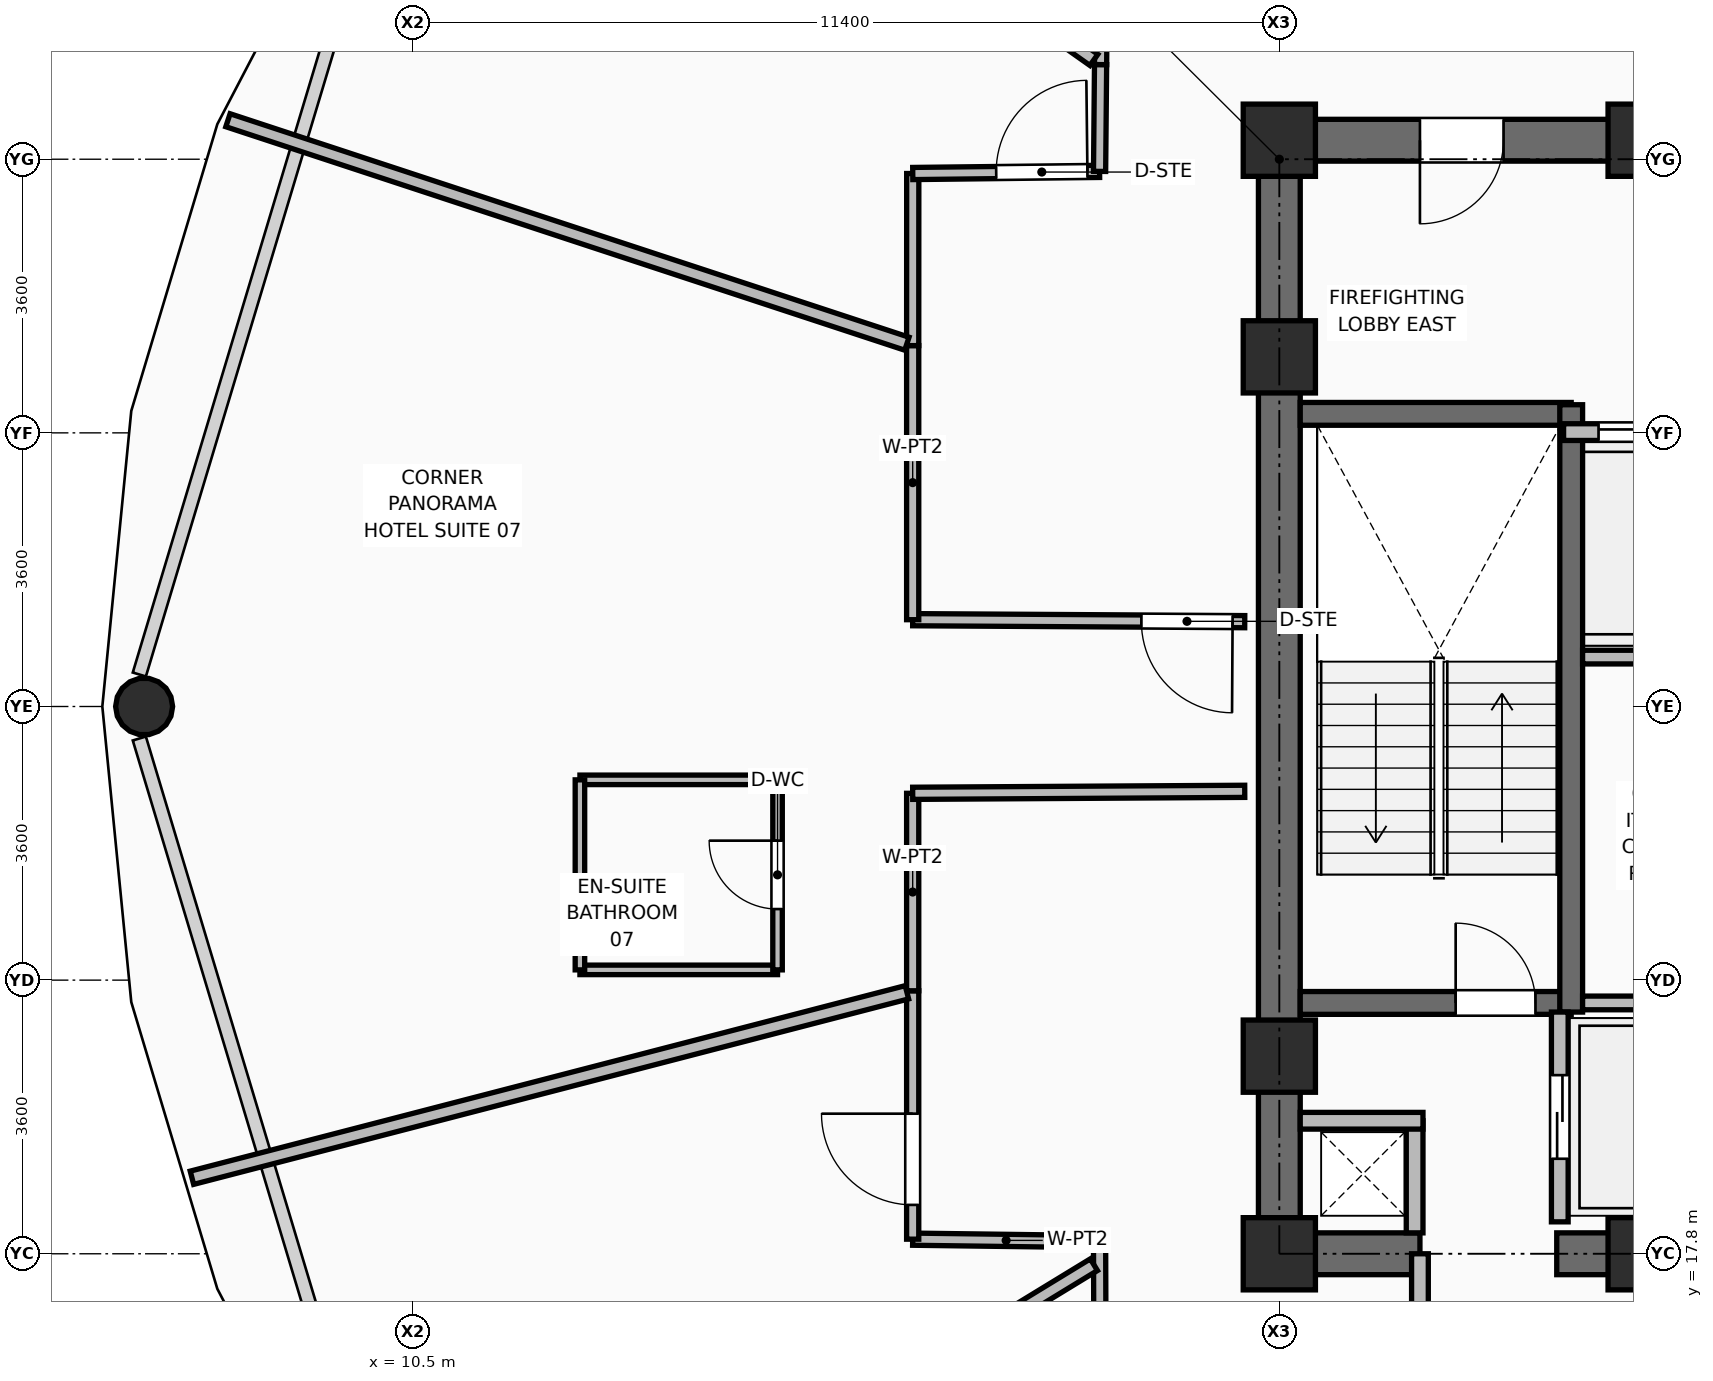
"""IFC4 building model, lengths in metres.
Left out: names, types, materials, properties, quantities, classifications, styles, units other than length and angle.
Written with IfcOpenShell. Run it as: python <this file> out.ifc"""

import sys

from ifc_helpers import new_model, si_unit, direction, frame, frame_2d, origin, origin_2d, place, context, subcontext, project, spatial, rectangle, hollow_circle, extrude, element, fill, save


model = new_model("IFC4")
c1 = context("Model", 3, precision=1e-05, world=origin(), true_north=direction((0.0, 1.0)))
c2 = subcontext(c1, "Body", "Model", "MODEL_VIEW")
j1 = project(units=[si_unit("LENGTHUNIT", "METRE"), si_unit("PLANEANGLEUNIT", "RADIAN")], contexts=[c1])
p1 = place(None, origin())
s1 = spatial("IfcSite", under=j1, at=p1, CompositionType="ELEMENT")
p2 = place(p1, origin())
s2 = spatial("IfcBuilding", under=s1, at=p2, CompositionType="ELEMENT")
p3 = place(p2, frame((0.0, 0.0, 168.45)))
s3 = spatial("IfcBuildingStorey", under=s2, at=p3, CompositionType="ELEMENT", Elevation=168.45)
for number, where, z_axis, x_axis in (
    (1, (21.9, 17.8, 0.0), (0.0, 0.0, 1.0), (1.0, 0.0, 0.0)),
    (2, (26.7, 17.8, 0.0), (0.0, 0.0, 1.0), (1.0, 0.0, 0.0)),
    (3, (21.9, 20.4, 0.0), (0.0, 0.0, 1.0), (1.0, 0.0, 0.0)),
    (4, (21.9, 29.6, 0.0), (0.0, 0.0, 1.0), (1.0, 0.0, 0.0)),
    (5, (21.9, 32.45, 0.0), (0.0, 0.0, 1.0), (1.0, 0.0, 0.0)),
    (6, (26.7, 32.45, 0.0), (0.0, 0.0, 1.0), (1.0, 0.0, 0.0)),
):
    element("IfcColumn", number, at=place(p3, frame(where, z_axis=z_axis, x_axis=x_axis)), inside=s3, PredefinedType="COLUMN", context=c2, shape_type="SweptSolid", body=[
        extrude(rectangle(XDim=0.95, YDim=0.95, at=origin_2d()), origin(), (0.0, 0.0, 1.0), 3.75),
    ])
p4 = place(p3, frame((6.964, 25.0, 0.0), z_axis=(0.0, 0.0, 1.0), x_axis=(1.0, 0.0, 0.0)))
e7 = element("IfcColumn", 7, at=p4, inside=s3, PredefinedType="COLUMN", context=c2, shape_type="SweptSolid", body=[
    extrude(hollow_circle(Radius=0.375, WallThickness=0.035, at=origin_2d()), origin(), (0.0, 0.0, 1.0), 3.57),
])
p5 = place(p3, frame((21.625, 17.8, 0.0), z_axis=(0.0, 0.0, 1.0), x_axis=(1.0, 0.0, 0.0)))
e8 = element("IfcWall", 8, at=p5, inside=s3, PredefinedType="SHEAR", context=c2, shape_type="SweptSolid", body=[
    extrude(rectangle(XDim=2.125, YDim=0.55, at=frame_2d((1.062, 0.0))), origin(), (0.0, 0.0, 1.0), 3.57),
])
p6 = place(p3, frame((25.55, 17.8, 0.0), z_axis=(0.0, 0.0, 1.0), x_axis=(1.0, 0.0, 0.0)))
e9 = element("IfcWall", 9, at=p6, inside=s3, PredefinedType="SHEAR", context=c2, shape_type="SweptSolid", body=[
    extrude(rectangle(XDim=6.9, YDim=0.55, at=frame_2d((3.45, 0.0))), origin(), (0.0, 0.0, 1.0), 3.57),
])
p7 = place(p3, frame((21.625, 32.45, 0.0), z_axis=(0.0, 0.0, 1.0), x_axis=(1.0, 0.0, 0.0)))
e10 = element("IfcWall", 10, at=p7, inside=s3, PredefinedType="SHEAR", context=c2, shape_type="SweptSolid", body=[
    extrude(rectangle(XDim=19.75, YDim=0.55, at=frame_2d((9.875, 0.0))), origin(), (0.0, 0.0, 1.0), 3.57),
])
p8 = place(p7, frame((2.125, 0.0, 0.0)))
e11 = element("IfcOpeningElement", 11, at=p8, cuts=e10, PredefinedType="OPENING", context=c2, shape_type="SweptSolid", body=[
    extrude(rectangle(XDim=1.1, YDim=2.1, at=frame_2d((0.55, 1.05))), frame((0.0, 0.285, 0.0), z_axis=(0.0, -1.0, 0.0), x_axis=(1.0, 0.0, 0.0)), (0.0, 0.0, 1.0), 0.57),
])
p9 = place(p7, frame((15.515, 0.0, 0.0)))
e12 = element("IfcOpeningElement", 12, at=p9, cuts=e10, PredefinedType="OPENING", context=c2, shape_type="SweptSolid", body=[
    extrude(rectangle(XDim=1.0, YDim=2.1, at=frame_2d((0.5, 1.05))), frame((0.0, 0.285, 0.0), z_axis=(0.0, -1.0, 0.0), x_axis=(1.0, 0.0, 0.0)), (0.0, 0.0, 1.0), 0.57),
])
p10 = place(p7, frame((17.525, 0.0, 0.0)))
e13 = element("IfcOpeningElement", 13, at=p10, cuts=e10, PredefinedType="OPENING", context=c2, shape_type="SweptSolid", body=[
    extrude(rectangle(XDim=0.9, YDim=2.1, at=frame_2d((0.45, 1.05))), frame((0.0, 0.285, 0.0), z_axis=(0.0, -1.0, 0.0), x_axis=(1.0, 0.0, 0.0)), (0.0, 0.0, 1.0), 0.57),
])
p11 = place(p3, frame((21.9, 18.075, 0.0), z_axis=(0.0, 0.0, 1.0), x_axis=(0.0, 1.0, 0.0)))
e14 = element("IfcWall", 14, at=p11, inside=s3, PredefinedType="SHEAR", context=c2, shape_type="SweptSolid", body=[
    extrude(rectangle(XDim=14.1, YDim=0.55, at=frame_2d((7.05, 0.0))), origin(), (0.0, 0.0, 1.0), 3.57),
])
p12 = place(p3, frame((22.175, 21.1, 0.0), z_axis=(0.0, 0.0, 1.0), x_axis=(1.0, 0.0, 0.0)))
e15 = element("IfcWall", 15, at=p12, inside=s3, PredefinedType="SHEAR", context=c2, shape_type="SweptSolid", body=[
    extrude(rectangle(XDim=3.565, YDim=0.3, at=frame_2d((1.782, 0.0))), origin(), (0.0, 0.0, 1.0), 3.57),
])
p13 = place(p12, frame((2.045, 0.0, 0.0)))
e16 = element("IfcOpeningElement", 16, at=p13, cuts=e15, PredefinedType="OPENING", context=c2, shape_type="SweptSolid", body=[
    extrude(rectangle(XDim=1.05, YDim=2.1, at=frame_2d((0.525, 1.05))), frame((0.0, 0.16, 0.0), z_axis=(0.0, -1.0, 0.0), x_axis=(1.0, 0.0, 0.0)), (0.0, 0.0, 1.0), 0.32),
])
p14 = place(p3, frame((22.175, 28.85, 0.0), z_axis=(0.0, 0.0, 1.0), x_axis=(1.0, 0.0, 0.0)))
e17 = element("IfcWall", 17, at=p14, inside=s3, PredefinedType="SHEAR", context=c2, shape_type="SweptSolid", body=[
    extrude(rectangle(XDim=3.565, YDim=0.3, at=frame_2d((1.782, 0.0))), origin(), (0.0, 0.0, 1.0), 3.57),
])
p15 = place(p3, frame((25.74, 20.98, 0.0), z_axis=(0.0, 0.0, 1.0), x_axis=(0.0, 1.0, 0.0)))
e18 = element("IfcWall", 18, at=p15, inside=s3, PredefinedType="SHEAR", context=c2, shape_type="SweptSolid", body=[
    extrude(rectangle(XDim=7.99, YDim=0.3, at=frame_2d((3.995, 0.0))), origin(), (0.0, 0.0, 1.0), 3.57),
])
p16 = place(p3, frame((23.68, 18.075, 0.0), z_axis=(0.0, 0.0, 1.0), x_axis=(0.0, 1.0, 0.0)))
e19 = element("IfcWall", 19, at=p16, inside=s3, PredefinedType="PARTITIONING", context=c2, shape_type="SweptSolid", body=[
    extrude(rectangle(XDim=1.475, YDim=0.22, at=frame_2d((0.738, 0.0))), origin(), (0.0, 0.0, 1.0), 3.55),
])
p17 = place(p3, frame((22.175, 19.55, 0.0), z_axis=(0.0, 0.0, 1.0), x_axis=(1.0, 0.0, 0.0)))
e20 = element("IfcWall", 20, at=p17, inside=s3, PredefinedType="PARTITIONING", context=c2, shape_type="SweptSolid", body=[
    extrude(rectangle(XDim=1.615, YDim=0.22, at=frame_2d((0.808, 0.0))), origin(), (0.0, 0.0, 1.0), 2.595),
])
p18 = place(p3, frame((25.59, 18.22, 0.0), z_axis=(0.0, 0.0, 1.0), x_axis=(0.0, 1.0, 0.0)))
e21 = element("IfcWall", 21, at=p18, inside=s3, PredefinedType="PARTITIONING", context=c2, shape_type="SweptSolid", body=[
    extrude(rectangle(XDim=2.76, YDim=0.22, at=frame_2d((1.38, 0.0))), origin(), (0.0, 0.0, 1.0), 3.55),
])
p19 = place(p18, frame((0.83, 0.0, 0.0)))
e22 = element("IfcOpeningElement", 22, at=p19, cuts=e21, PredefinedType="OPENING", context=c2, shape_type="SweptSolid", body=[
    extrude(rectangle(XDim=1.1, YDim=2.2, at=frame_2d((0.55, 1.1))), frame((0.0, 0.12, 0.0), z_axis=(0.0, -1.0, 0.0), x_axis=(1.0, 0.0, 0.0)), (0.0, 0.0, 1.0), 0.24),
])
p20 = place(p3, frame((25.64, 28.61, 0.0), z_axis=(0.0, 0.0, 1.0), x_axis=(1.0, 0.0, 0.0)))
e23 = element("IfcWall", 23, at=p20, inside=s3, PredefinedType="PARTITIONING", context=c2, shape_type="SweptSolid", body=[
    extrude(rectangle(XDim=2.02, YDim=0.22, at=frame_2d((1.01, 0.0))), origin(), (0.0, 0.0, 1.0), 3.55),
])
p21 = place(p20, frame((0.46, 0.0, 0.0)))
e24 = element("IfcOpeningElement", 24, at=p21, cuts=e23, PredefinedType="OPENING", context=c2, shape_type="SweptSolid", body=[
    extrude(rectangle(XDim=1.1, YDim=2.2, at=frame_2d((0.55, 1.1))), frame((0.0, 0.12, 0.0), z_axis=(0.0, -1.0, 0.0), x_axis=(1.0, 0.0, 0.0)), (0.0, 0.0, 1.0), 0.24),
])
for number, where, z_axis, x_axis in (
    (25, (25.89, 21.1, 0.0), (0.0, 0.0, 1.0), (1.0, 0.0, 0.0)),
    (26, (25.89, 25.65, 0.0), (0.0, 0.0, 1.0), (1.0, 0.0, 0.0)),
):
    element("IfcWall", number, at=place(p3, frame(where, z_axis=z_axis, x_axis=x_axis)), inside=s3, PredefinedType="PARTITIONING", context=c2, shape_type="SweptSolid", body=[
        extrude(rectangle(XDim=1.7, YDim=0.18, at=frame_2d((0.85, 0.0))), origin(), (0.0, 0.0, 1.0), 3.55),
    ])
p22 = place(p3, frame((23.75, 14.35, 0.0), z_axis=(0.0, 0.0, 1.0), x_axis=(0.0, 1.0, 0.0)))
e27 = element("IfcWall", 27, at=p22, inside=s3, PredefinedType="PARTITIONING", context=c2, shape_type="SweptSolid", body=[
    extrude(rectangle(XDim=3.45, YDim=0.22, at=frame_2d((1.725, 0.0))), origin(), (0.0, 0.0, 1.0), 3.006),
])
p23 = place(p3, frame((21.445, 26.116, 0.0), z_axis=(0.0, 0.0, 1.0), x_axis=(-0.99998212632, 0.005978882852, 0.0)))
e28 = element("IfcWall", 28, at=p23, inside=s3, PredefinedType="PARTITIONING", context=c2, shape_type="SweptSolid", body=[
    extrude(rectangle(XDim=4.369, YDim=0.16, at=frame_2d((2.185, 0.0))), origin(), (0.0, 0.0, 1.0), 2.595),
])
p24 = place(p23, frame((0.16, 0.0, 0.0)))
e29 = element("IfcOpeningElement", 29, at=p24, cuts=e28, PredefinedType="OPENING", context=c2, shape_type="SweptSolid", body=[
    extrude(rectangle(XDim=1.2, YDim=2.1, at=frame_2d((0.6, 1.05))), frame((0.0, 0.09, 0.0), z_axis=(0.0, -1.0, 0.0), x_axis=(1.0, 0.0, 0.0)), (0.0, 0.0, 1.0), 0.18),
])
p25 = place(p3, frame((17.076, 26.142, 0.0), z_axis=(0.0, 0.0, 1.0), x_axis=(0.0, 1.0, 0.0)))
e30 = element("IfcWall", 30, at=p25, inside=s3, PredefinedType="PARTITIONING", context=c2, shape_type="SweptSolid", body=[
    extrude(rectangle(XDim=3.606, YDim=0.16, at=frame_2d((1.803, 0.0))), origin(), (0.0, 0.0, 1.0), 3.55),
])
p26 = place(p3, frame((17.076, 29.748, 0.0), z_axis=(0.0, 0.0, 1.0), x_axis=(0.000431359822, 0.999999906964, 0.0)))
e31 = element("IfcWall", 31, at=p26, inside=s3, PredefinedType="PARTITIONING", context=c2, shape_type="SweptSolid", body=[
    extrude(rectangle(XDim=2.264, YDim=0.16, at=frame_2d((1.132, 0.0))), origin(), (0.0, 0.0, 1.0), 3.55),
])
p27 = place(p3, frame((17.077, 32.012, 0.0), z_axis=(0.0, 0.0, 1.0), x_axis=(0.999934771592, 0.011421583108, 0.0)))
e32 = element("IfcWall", 32, at=p27, inside=s3, PredefinedType="PARTITIONING", context=c2, shape_type="SweptSolid", body=[
    extrude(rectangle(XDim=2.458, YDim=0.16, at=frame_2d((1.229, 0.0))), origin(), (0.0, 0.0, 1.0), 3.55),
])
p28 = place(p27, frame((1.098, 0.0, 0.0)))
e33 = element("IfcOpeningElement", 33, at=p28, cuts=e32, PredefinedType="OPENING", context=c2, shape_type="SweptSolid", body=[
    extrude(rectangle(XDim=1.2, YDim=2.1, at=frame_2d((0.6, 1.05))), frame((0.0, 0.09, 0.0), z_axis=(0.0, -1.0, 0.0), x_axis=(1.0, 0.0, 0.0)), (0.0, 0.0, 1.0), 0.18),
])
p29 = place(p3, frame((19.535, 32.04, 0.0), z_axis=(0.0, 0.0, 1.0), x_axis=(0.009382732056, 0.999955981201, 0.0)))
e34 = element("IfcWall", 34, at=p29, inside=s3, PredefinedType="PARTITIONING", context=c2, shape_type="SweptSolid", body=[
    extrude(rectangle(XDim=1.405, YDim=0.16, at=frame_2d((0.703, 0.0))), origin(), (0.0, 0.0, 1.0), 3.006),
])
p30 = place(p3, frame((19.548, 33.445, 0.0), z_axis=(0.0, 0.0, 1.0), x_axis=(0.008751227658, 0.999961707274, 0.0)))
e35 = element("IfcWall", 35, at=p30, inside=s3, PredefinedType="PARTITIONING", context=c2, shape_type="SweptSolid", body=[
    extrude(rectangle(XDim=1.367, YDim=0.16, at=frame_2d((0.684, 0.0))), origin(), (0.0, 0.0, 1.0), 3.55),
])
p31 = place(p3, frame((19.553, 12.157, 0.0), z_axis=(0.0, 0.0, 1.0), x_axis=(-0.003113283747, 0.99999515372, 0.0)))
e36 = element("IfcWall", 36, at=p31, inside=s3, PredefinedType="PARTITIONING", context=c2, shape_type="SweptSolid", body=[
    extrude(rectangle(XDim=5.803, YDim=0.16, at=frame_2d((2.901, 0.0))), origin(), (0.0, 0.0, 1.0), 3.006),
])
p32 = place(p31, frame((3.705, 0.0, 0.0)))
e37 = element("IfcOpeningElement", 37, at=p32, cuts=e36, PredefinedType="OPENING", context=c2, shape_type="SweptSolid", body=[
    extrude(rectangle(XDim=1.2, YDim=2.1, at=frame_2d((0.6, 1.05))), frame((0.0, 0.09, 0.0), z_axis=(0.0, -1.0, 0.0), x_axis=(1.0, 0.0, 0.0)), (0.0, 0.0, 1.0), 0.18),
])
p33 = place(p3, frame((19.535, 17.96, 0.0), z_axis=(0.0, 0.0, 1.0), x_axis=(-0.999915428104, 0.013005254277, 0.0)))
e38 = element("IfcWall", 38, at=p33, inside=s3, PredefinedType="PARTITIONING", context=c2, shape_type="SweptSolid", body=[
    extrude(rectangle(XDim=2.459, YDim=0.16, at=frame_2d((1.229, 0.0))), origin(), (0.0, 0.0, 1.0), 3.55),
])
p34 = place(p3, frame((17.076, 17.992, 0.0), z_axis=(0.0, 0.0, 1.0), x_axis=(0.0, 1.0, 0.0)))
e39 = element("IfcWall", 39, at=p34, inside=s3, PredefinedType="PARTITIONING", context=c2, shape_type="SweptSolid", body=[
    extrude(rectangle(XDim=3.268, YDim=0.16, at=frame_2d((1.634, 0.0))), origin(), (0.0, 0.0, 1.0), 3.55),
])
p35 = place(p34, frame((0.451, 0.0, 0.0)))
e40 = element("IfcOpeningElement", 40, at=p35, cuts=e39, PredefinedType="OPENING", context=c2, shape_type="SweptSolid", body=[
    extrude(rectangle(XDim=1.2, YDim=2.1, at=frame_2d((0.6, 1.05))), frame((0.0, 0.09, 0.0), z_axis=(0.0, -1.0, 0.0), x_axis=(1.0, 0.0, 0.0)), (0.0, 0.0, 1.0), 0.18),
])
p36 = place(p3, frame((17.076, 21.26, 0.0), z_axis=(0.0, 0.0, 1.0), x_axis=(0.0, 1.0, 0.0)))
e41 = element("IfcWall", 41, at=p36, inside=s3, PredefinedType="PARTITIONING", context=c2, shape_type="SweptSolid", body=[
    extrude(rectangle(XDim=2.598, YDim=0.16, at=frame_2d((1.299, 0.0))), origin(), (0.0, 0.0, 1.0), 3.006),
])
p37 = place(p3, frame((17.076, 23.858, 0.0), z_axis=(0.0, 0.0, 1.0), x_axis=(0.99998212632, 0.005978882852, 0.0)))
e42 = element("IfcWall", 42, at=p37, inside=s3, PredefinedType="PARTITIONING", context=c2, shape_type="SweptSolid", body=[
    extrude(rectangle(XDim=4.369, YDim=0.16, at=frame_2d((2.185, 0.0))), origin(), (0.0, 0.0, 1.0), 2.595),
])
p38 = place(p3, frame((19.46, 33.507, 0.0), z_axis=(0.0, 0.0, 1.0), x_axis=(-0.816740398998, 0.577005303827, 0.0)))
e43 = element("IfcWall", 43, at=p38, inside=s3, PredefinedType="PARTITIONING", context=c2, shape_type="SweptSolid", body=[
    extrude(rectangle(XDim=9.194, YDim=0.18, at=frame_2d((4.597, 0.0))), origin(), (0.0, 0.0, 1.0), 2.852),
])
p39 = place(p3, frame((17.0, 29.773, 0.0), z_axis=(0.0, 0.0, 1.0), x_axis=(-0.949880965401, 0.312611822502, 0.0)))
e44 = element("IfcWall", 44, at=p39, inside=s3, PredefinedType="PARTITIONING", context=c2, shape_type="SweptSolid", body=[
    extrude(rectangle(XDim=9.405, YDim=0.18, at=frame_2d((4.702, 0.0))), origin(), (0.0, 0.0, 1.0), 2.852),
])
p40 = place(p3, frame((17.0, 21.24, 0.0), z_axis=(0.0, 0.0, 1.0), x_axis=(-0.96796954255, -0.251067649639, 0.0)))
e45 = element("IfcWall", 45, at=p40, inside=s3, PredefinedType="PARTITIONING", context=c2, shape_type="SweptSolid", body=[
    extrude(rectangle(XDim=9.718, YDim=0.18, at=frame_2d((4.859, 0.0))), origin(), (0.0, 0.0, 1.0), 2.852),
])
p41 = place(p3, frame((19.46, 17.656, 0.0), z_axis=(0.0, 0.0, 1.0), x_axis=(-0.853711993856, -0.520745457537, 0.0)))
e46 = element("IfcWall", 46, at=p41, inside=s3, PredefinedType="PARTITIONING", context=c2, shape_type="SweptSolid", body=[
    extrude(rectangle(XDim=9.968, YDim=0.18, at=frame_2d((4.984, 0.0))), origin(), (0.0, 0.0, 1.0), 2.852),
])
for number, where, z_axis, x_axis in (
    (47, (12.698, 21.535, 0.0), (0.0, 0.0, 1.0), (1.0, 0.0, 0.0)),
    (48, (12.698, 24.035, 0.0), (0.0, 0.0, 1.0), (1.0, 0.0, 0.0)),
):
    element("IfcWall", number, at=place(p3, frame(where, z_axis=z_axis, x_axis=x_axis)), inside=s3, PredefinedType="PARTITIONING", context=c2, shape_type="SweptSolid", body=[
        extrude(rectangle(XDim=2.6, YDim=0.125, at=frame_2d((1.3, 0.0))), origin(), (0.0, 0.0, 1.0), 3.55),
    ])
p42 = place(p3, frame((12.698, 21.535, 0.0), z_axis=(0.0, 0.0, 1.0), x_axis=(0.0, 1.0, 0.0)))
e49 = element("IfcWall", 49, at=p42, inside=s3, PredefinedType="PARTITIONING", context=c2, shape_type="SweptSolid", body=[
    extrude(rectangle(XDim=2.5, YDim=0.125, at=frame_2d((1.25, 0.0))), origin(), (0.0, 0.0, 1.0), 3.006),
])
p43 = place(p3, frame((15.298, 21.535, 0.0), z_axis=(0.0, 0.0, 1.0), x_axis=(0.0, 1.0, 0.0)))
e50 = element("IfcWall", 50, at=p43, inside=s3, PredefinedType="PARTITIONING", context=c2, shape_type="SweptSolid", body=[
    extrude(rectangle(XDim=2.5, YDim=0.125, at=frame_2d((1.25, 0.0))), origin(), (0.0, 0.0, 1.0), 3.006),
])
p44 = place(p43, frame((0.8, 0.0, 0.0)))
e51 = element("IfcOpeningElement", 51, at=p44, cuts=e50, PredefinedType="OPENING", context=c2, shape_type="SweptSolid", body=[
    extrude(rectangle(XDim=0.9, YDim=2.1, at=frame_2d((0.45, 1.05))), frame((0.0, 0.073, 0.0), z_axis=(0.0, -1.0, 0.0), x_axis=(1.0, 0.0, 0.0)), (0.0, 0.0, 1.0), 0.145),
])
p45 = place(p13, origin())
e52 = element("IfcDoor", 52, at=p45, inside=s3, OperationType="SINGLE_SWING_LEFT", PredefinedType="DOOR", context=c2, shape_type="SweptSolid", body=[
    extrude(rectangle(XDim=1.05, YDim=2.1, at=frame_2d((0.525, 1.05))), frame((0.0, 0.025, 0.0), z_axis=(0.0, -1.0, 0.0), x_axis=(1.0, 0.0, 0.0)), (0.0, 0.0, 1.0), 0.05),
])
fill(e16, e52)
p46 = place(p19, origin())
e53 = element("IfcDoor", 53, at=p46, inside=s3, OperationType="DOUBLE_DOOR_SLIDING", PredefinedType="DOOR", context=c2, shape_type="SweptSolid", body=[
    extrude(rectangle(XDim=1.1, YDim=2.2, at=frame_2d((0.55, 1.1))), frame((0.0, 0.025, 0.0), z_axis=(0.0, -1.0, 0.0), x_axis=(1.0, 0.0, 0.0)), (0.0, 0.0, 1.0), 0.05),
])
fill(e22, e53)
p47 = place(p21, origin())
e54 = element("IfcDoor", 54, at=p47, inside=s3, OperationType="DOUBLE_DOOR_SLIDING", PredefinedType="DOOR", context=c2, shape_type="SweptSolid", body=[
    extrude(rectangle(XDim=1.1, YDim=2.2, at=frame_2d((0.55, 1.1))), frame((0.0, 0.025, 0.0), z_axis=(0.0, -1.0, 0.0), x_axis=(1.0, 0.0, 0.0)), (0.0, 0.0, 1.0), 0.05),
])
fill(e24, e54)
p48 = place(p8, frame((1.1, 0.0, 0.0), z_axis=(0.0, 0.0, 1.0), x_axis=(-1.0, 0.0, 0.0)))
e55 = element("IfcDoor", 55, at=p48, inside=s3, OperationType="SINGLE_SWING_RIGHT", PredefinedType="DOOR", context=c2, shape_type="SweptSolid", body=[
    extrude(rectangle(XDim=1.1, YDim=2.1, at=frame_2d((0.55, 1.05))), frame((0.0, 0.025, 0.0), z_axis=(0.0, -1.0, 0.0), x_axis=(1.0, 0.0, 0.0)), (0.0, 0.0, 1.0), 0.05),
])
fill(e11, e55)
p49 = place(p28, origin())
e56 = element("IfcDoor", 56, at=p49, inside=s3, OperationType="SINGLE_SWING_RIGHT", PredefinedType="DOOR", context=c2, shape_type="SweptSolid", body=[
    extrude(rectangle(XDim=1.2, YDim=2.1, at=frame_2d((0.6, 1.05))), frame((0.0, 0.025, 0.0), z_axis=(0.0, -1.0, 0.0), x_axis=(1.0, 0.0, 0.0)), (0.0, 0.0, 1.0), 0.05),
])
fill(e33, e56)
p50 = place(p44, origin())
e57 = element("IfcDoor", 57, at=p50, inside=s3, OperationType="SINGLE_SWING_RIGHT", PredefinedType="DOOR", context=c2, shape_type="SweptSolid", body=[
    extrude(rectangle(XDim=0.9, YDim=2.1, at=frame_2d((0.45, 1.05))), frame((0.0, 0.025, 0.0), z_axis=(0.0, -1.0, 0.0), x_axis=(1.0, 0.0, 0.0)), (0.0, 0.0, 1.0), 0.05),
])
fill(e51, e57)
p51 = place(p24, origin())
e58 = element("IfcDoor", 58, at=p51, inside=s3, OperationType="SINGLE_SWING_LEFT", PredefinedType="DOOR", context=c2, shape_type="SweptSolid", body=[
    extrude(rectangle(XDim=1.2, YDim=2.1, at=frame_2d((0.6, 1.05))), frame((0.0, 0.025, 0.0), z_axis=(0.0, -1.0, 0.0), x_axis=(1.0, 0.0, 0.0)), (0.0, 0.0, 1.0), 0.05),
])
fill(e29, e58)
p52 = place(p35, origin())
e59 = element("IfcDoor", 59, at=p52, inside=s3, OperationType="SINGLE_SWING_RIGHT", PredefinedType="DOOR", context=c2, shape_type="SweptSolid", body=[
    extrude(rectangle(XDim=1.2, YDim=2.1, at=frame_2d((0.6, 1.05))), frame((0.0, 0.025, 0.0), z_axis=(0.0, -1.0, 0.0), x_axis=(1.0, 0.0, 0.0)), (0.0, 0.0, 1.0), 0.05),
])
fill(e40, e59)
save(model, sys.argv[1])
